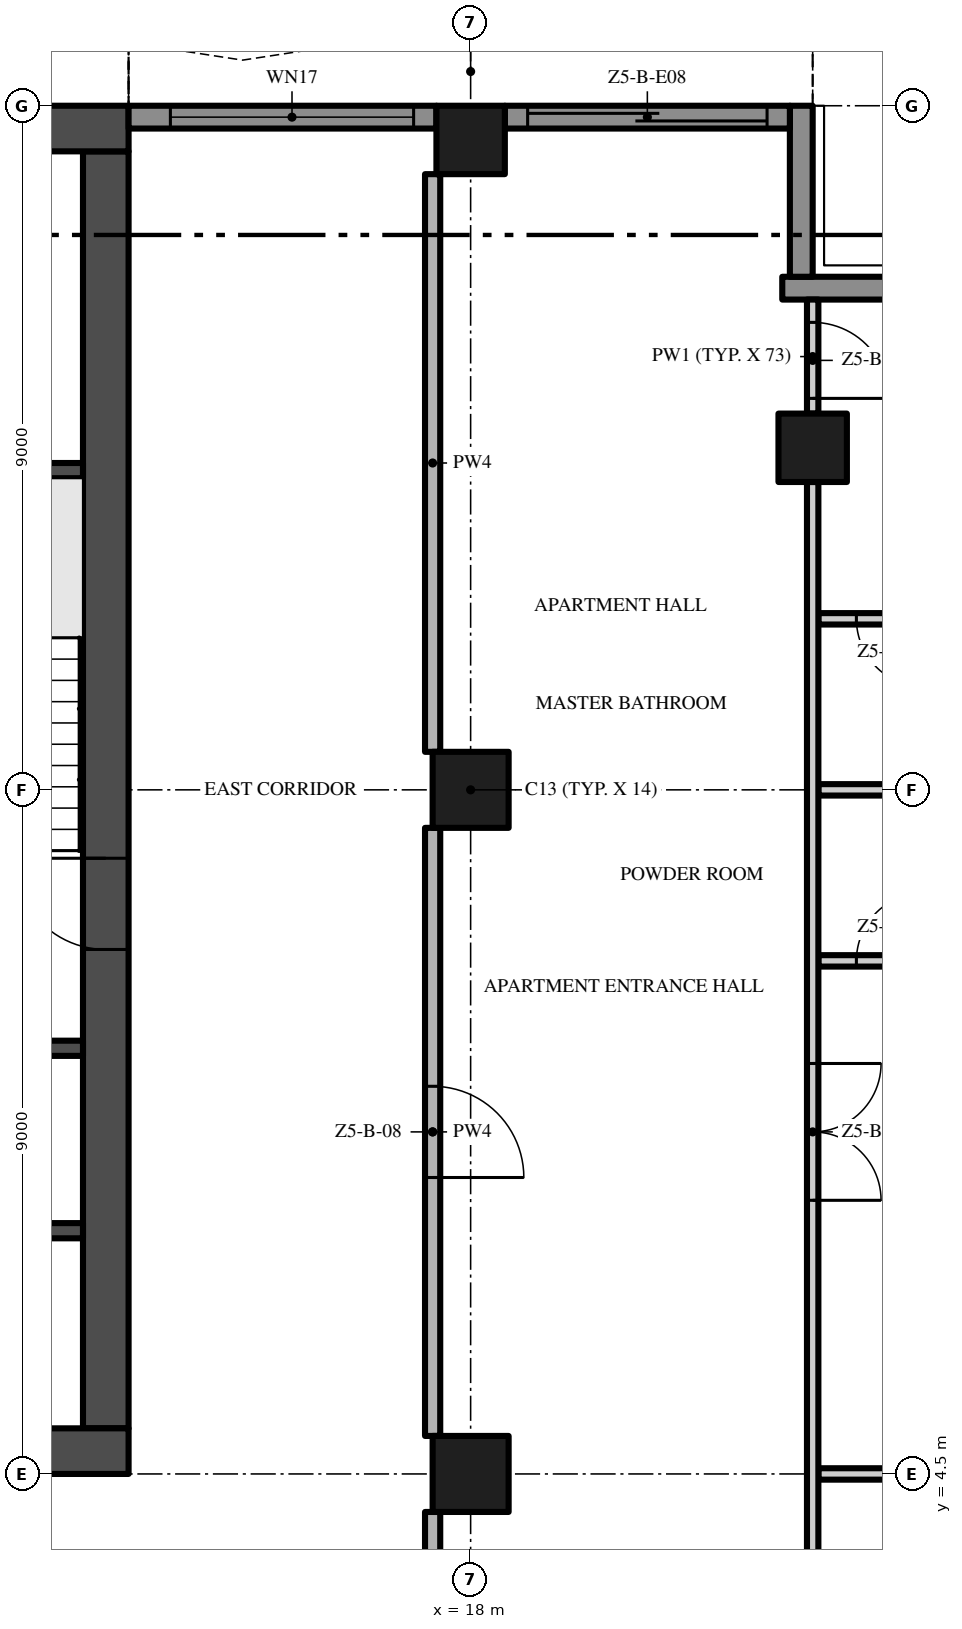
"""IFC4 building model, lengths in metres.
Left out: names, types, materials, properties, quantities, classifications, styles, units other than length and angle.
Written with IfcOpenShell. Run it as: python <this file> out.ifc"""

import sys

from ifc_helpers import new_model, si_unit, direction, frame, frame_2d, origin, origin_2d, place, context, subcontext, project, spatial, polyline, rectangle, outline, extrude, element, fill, save


model = new_model("IFC4")
c1 = context("Model", 3, precision=1e-05, world=origin(), true_north=direction((0.0, 1.0)))
c2 = subcontext(c1, "Body", "Model", "MODEL_VIEW")
j1 = project(units=[si_unit("LENGTHUNIT", "METRE"), si_unit("PLANEANGLEUNIT", "RADIAN")], contexts=[c1])
p1 = place(None, origin())
s1 = spatial("IfcSite", under=j1, at=p1, CompositionType="ELEMENT")
p2 = place(p1, origin())
s2 = spatial("IfcBuilding", under=s1, at=p2, CompositionType="ELEMENT")
p3 = place(p2, frame((0.0, 0.0, 250.2)))
s3 = spatial("IfcBuildingStorey", under=s2, at=p3, CompositionType="ELEMENT", Elevation=250.2)
p4 = place(p3, frame((-13.5, 4.8, -0.3), z_axis=(0.0, 0.0, 1.0), x_axis=(1.0, 0.0, 0.0)))
e1 = element("IfcWall", 1, at=p4, inside=s3, PredefinedType="SHEAR", context=c2, shape_type="SweptSolid", body=[
    extrude(rectangle(XDim=27.0, YDim=0.6, at=frame_2d((13.5, 0.0))), origin(), (0.0, 0.0, 1.0), 3.8),
])
p5 = place(p4, frame((12.0, 0.0, 0.3)))
e2 = element("IfcOpeningElement", 2, at=p5, cuts=e1, PredefinedType="OPENING", context=c2, shape_type="SweptSolid", body=[
    extrude(rectangle(XDim=3.0, YDim=2.4, at=frame_2d((1.5, 1.2))), frame((0.0, 0.31, 0.0), z_axis=(0.0, -1.0, 0.0), x_axis=(1.0, 0.0, 0.0)), (0.0, 0.0, 1.0), 0.62),
])
p6 = place(p4, frame((4.9, 0.0, 0.3)))
e3 = element("IfcOpeningElement", 3, at=p6, cuts=e1, PredefinedType="OPENING", context=c2, shape_type="SweptSolid", body=[
    extrude(rectangle(XDim=1.2, YDim=2.2, at=frame_2d((0.6, 1.1))), frame((0.0, 0.31, 0.0), z_axis=(0.0, -1.0, 0.0), x_axis=(1.0, 0.0, 0.0)), (0.0, 0.0, 1.0), 0.62),
])
p7 = place(p4, frame((20.75, 0.0, 0.3)))
e4 = element("IfcOpeningElement", 4, at=p7, cuts=e1, PredefinedType="OPENING", context=c2, shape_type="SweptSolid", body=[
    extrude(rectangle(XDim=1.5, YDim=2.2, at=frame_2d((0.75, 1.1))), frame((0.0, 0.31, 0.0), z_axis=(0.0, -1.0, 0.0), x_axis=(1.0, 0.0, 0.0)), (0.0, 0.0, 1.0), 0.62),
])
p8 = place(p4, frame((17.4, 0.0, 0.3)))
e5 = element("IfcOpeningElement", 5, at=p8, cuts=e1, PredefinedType="OPENING", context=c2, shape_type="SweptSolid", body=[
    extrude(rectangle(XDim=1.2, YDim=2.2, at=frame_2d((0.6, 1.1))), frame((0.0, 0.31, 0.0), z_axis=(0.0, -1.0, 0.0), x_axis=(1.0, 0.0, 0.0)), (0.0, 0.0, 1.0), 0.62),
])
p9 = place(p3, frame((13.2, 5.1, -0.3), z_axis=(0.0, 0.0, 1.0), x_axis=(0.0, 1.0, 0.0)))
e6 = element("IfcWall", 6, at=p9, inside=s3, PredefinedType="SHEAR", context=c2, shape_type="SweptSolid", body=[
    extrude(rectangle(XDim=16.8, YDim=0.6, at=frame_2d((8.4, 0.0))), origin(), (0.0, 0.0, 1.0), 3.8),
])
p10 = place(p9, frame((6.3, 0.0, 0.3)))
e7 = element("IfcOpeningElement", 7, at=p10, cuts=e6, PredefinedType="OPENING", context=c2, shape_type="SweptSolid", body=[
    extrude(rectangle(XDim=1.2, YDim=2.2, at=frame_2d((0.6, 1.1))), frame((0.0, 0.31, 0.0), z_axis=(0.0, -1.0, 0.0), x_axis=(1.0, 0.0, 0.0)), (0.0, 0.0, 1.0), 0.62),
])
p11 = place(p3, frame((13.5, 22.2, -0.3), z_axis=(0.0, 0.0, 1.0), x_axis=(-1.0, 0.0, 0.0)))
e8 = element("IfcWall", 8, at=p11, inside=s3, PredefinedType="SHEAR", context=c2, shape_type="SweptSolid", body=[
    extrude(rectangle(XDim=27.0, YDim=0.6, at=frame_2d((13.5, 0.0))), origin(), (0.0, 0.0, 1.0), 3.8),
])
p12 = place(p3, frame((18.0, 13.5, 0.0), z_axis=(0.0, 0.0, 1.0), x_axis=(1.0, 0.0, 0.0)))
e9 = element("IfcColumn", 9, at=p12, inside=s3, PredefinedType="COLUMN", context=c2, shape_type="SweptSolid", body=[
    extrude(rectangle(XDim=1.0, YDim=1.0, at=origin_2d()), origin(), (0.0, 0.0, 1.0), 3.5),
])
p13 = place(p3, frame((18.0, 22.05, 0.0), z_axis=(0.0, 0.0, 1.0), x_axis=(1.0, 0.0, 0.0)))
e10 = element("IfcColumn", 10, at=p13, inside=s3, PredefinedType="COLUMN", context=c2, shape_type="SweptSolid", body=[
    extrude(rectangle(XDim=0.9, YDim=0.9, at=origin_2d()), origin(), (0.0, 0.0, 1.0), 3.5),
])
p14 = place(p3, frame((18.0, 4.5, 0.0), z_axis=(0.0, 0.0, 1.0), x_axis=(1.0, 0.0, 0.0)))
e11 = element("IfcColumn", 11, at=p14, inside=s3, PredefinedType="COLUMN", context=c2, shape_type="SweptSolid", body=[
    extrude(rectangle(XDim=1.0, YDim=1.0, at=origin_2d()), origin(), (0.0, 0.0, 1.0), 3.5),
])
p15 = place(p3, frame((22.5, 18.0, 0.0), z_axis=(0.0, 0.0, 1.0), x_axis=(1.0, 0.0, 0.0)))
e12 = element("IfcColumn", 12, at=p15, inside=s3, PredefinedType="COLUMN", context=c2, shape_type="SweptSolid", body=[
    extrude(rectangle(XDim=0.9, YDim=0.9, at=origin_2d()), origin(), (0.0, 0.0, 1.0), 3.5),
])
p16 = place(p3, frame((22.1, 20.1, 0.0), z_axis=(0.0, 0.0, 1.0), x_axis=(1.0, 0.0, 0.0)))
e13 = element("IfcWall", 13, at=p16, inside=s3, PredefinedType="SOLIDWALL", context=c2, shape_type="SweptSolid", body=[
    extrude(rectangle(XDim=2.35, YDim=0.3, at=frame_2d((1.175, 0.0))), origin(), (0.0, 0.0, 1.0), 3.5),
])
p17 = place(p3, frame((22.35, 22.5, 0.0), z_axis=(0.0, 0.0, 1.0), x_axis=(0.0, -1.0, 0.0)))
e14 = element("IfcWall", 14, at=p17, inside=s3, PredefinedType="SOLIDWALL", context=c2, shape_type="SweptSolid", body=[
    extrude(rectangle(XDim=2.25, YDim=0.3, at=frame_2d((1.125, 0.0))), origin(), (0.0, 0.0, 1.0), 3.5),
])
p18 = place(p3, frame((18.45, 22.35, 0.0), z_axis=(0.0, 0.0, 1.0), x_axis=(1.0, 0.0, 0.0)))
e15 = element("IfcWall", 15, at=p18, inside=s3, PredefinedType="SOLIDWALL", context=c2, shape_type="SweptSolid", body=[
    extrude(rectangle(XDim=3.75, YDim=0.3, at=frame_2d((1.875, 0.0))), origin(), (0.0, 0.0, 1.0), 3.5),
])
p19 = place(p18, frame((0.3, 0.0, 0.0)))
e16 = element("IfcOpeningElement", 16, at=p19, cuts=e15, PredefinedType="OPENING", context=c2, shape_type="SweptSolid", body=[
    extrude(rectangle(XDim=3.15, YDim=2.4, at=frame_2d((1.575, 1.2))), frame((0.0, 0.16, 0.0), z_axis=(0.0, -1.0, 0.0), x_axis=(1.0, 0.0, 0.0)), (0.0, 0.0, 1.0), 0.32),
])
p20 = place(p3, frame((13.5, 22.35, 0.0), z_axis=(0.0, 0.0, 1.0), x_axis=(1.0, 0.0, 0.0)))
e17 = element("IfcWall", 17, at=p20, inside=s3, PredefinedType="SOLIDWALL", context=c2, shape_type="SweptSolid", body=[
    extrude(rectangle(XDim=4.05, YDim=0.3, at=frame_2d((2.025, 0.0))), origin(), (0.0, 0.0, 1.0), 3.5),
])
p21 = place(p20, frame((0.55, 0.0, 0.45)))
e18 = element("IfcOpeningElement", 18, at=p21, cuts=e17, PredefinedType="OPENING", context=c2, shape_type="SweptSolid", body=[
    extrude(rectangle(XDim=3.2, YDim=2.65, at=frame_2d((1.6, 1.325))), frame((0.0, 0.16, 0.0), z_axis=(0.0, -1.0, 0.0), x_axis=(1.0, 0.0, 0.0)), (0.0, 0.0, 1.0), 0.32),
])
p22 = place(p3, origin())
e19 = element("IfcWall", 19, at=p22, inside=s3, PredefinedType="USERDEFINED", context=c2, shape_type="SweptSolid", body=[
    extrude(outline(polyline([(22.5, 25.5), (21.0, 25.271), (19.5, 24.671), (18.0, 23.929), (16.5, 23.329), (15.0, 23.1), (13.5, 23.329), (13.462, 23.082), (15.0, 22.847), (16.566, 23.086), (18.102, 23.701), (19.602, 24.442), (21.066, 25.028), (22.538, 25.253), (22.5, 25.5)])), origin(), (0.0, 0.0, 1.0), 0.9),
])
for number, where, z_axis, x_axis in (
    (20, (9.65, 7.7, 0.0), (0.0, 0.0, 1.0), (1.0, 0.0, 0.0)),
    (21, (9.65, 10.1, 0.0), (0.0, 0.0, 1.0), (1.0, 0.0, 0.0)),
    (22, (9.65, 17.7, 0.0), (0.0, 0.0, 1.0), (1.0, 0.0, 0.0)),
):
    element("IfcWall", number, at=place(p3, frame(where, z_axis=z_axis, x_axis=x_axis)), inside=s3, PredefinedType="SHEAR", context=c2, shape_type="SweptSolid", body=[
        extrude(rectangle(XDim=3.25, YDim=0.2, at=frame_2d((1.625, 0.0))), origin(), (0.0, 0.0, 1.0), 3.5),
    ])
p23 = place(p3, frame((22.575, 4.5, 0.0), z_axis=(0.0, 0.0, 1.0), x_axis=(1.0, 0.0, 0.0)))
e23 = element("IfcWall", 23, at=p23, inside=s3, PredefinedType="PARTITIONING", context=c2, shape_type="SweptSolid", body=[
    extrude(rectangle(XDim=3.525, YDim=0.15, at=frame_2d((1.762, 0.0))), origin(), (0.0, 0.0, 1.0), 3.5),
])
p24 = place(p3, frame((22.575, 11.25, 0.0), z_axis=(0.0, 0.0, 1.0), x_axis=(1.0, 0.0, 0.0)))
e24 = element("IfcWall", 24, at=p24, inside=s3, PredefinedType="PARTITIONING", context=c2, shape_type="SweptSolid", body=[
    extrude(rectangle(XDim=1.875, YDim=0.15, at=frame_2d((0.938, 0.0))), origin(), (0.0, 0.0, 1.0), 3.5),
])
p25 = place(p24, frame((0.5, 0.0, 0.0)))
e25 = element("IfcOpeningElement", 25, at=p25, cuts=e24, PredefinedType="OPENING", context=c2, shape_type="SweptSolid", body=[
    extrude(rectangle(XDim=0.9, YDim=2.1, at=frame_2d((0.45, 1.05))), frame((0.0, 0.085, 0.0), z_axis=(0.0, -1.0, 0.0), x_axis=(1.0, 0.0, 0.0)), (0.0, 0.0, 1.0), 0.17),
])
p26 = place(p3, frame((22.575, 13.5, 0.0), z_axis=(0.0, 0.0, 1.0), x_axis=(1.0, 0.0, 0.0)))
e26 = element("IfcWall", 26, at=p26, inside=s3, PredefinedType="PARTITIONING", context=c2, shape_type="SweptSolid", body=[
    extrude(rectangle(XDim=1.875, YDim=0.15, at=frame_2d((0.938, 0.0))), origin(), (0.0, 0.0, 1.0), 3.5),
])
p27 = place(p3, frame((24.45, 15.75, 0.0), z_axis=(0.0, 0.0, 1.0), x_axis=(-1.0, 0.0, 0.0)))
e27 = element("IfcWall", 27, at=p27, inside=s3, PredefinedType="PARTITIONING", context=c2, shape_type="SweptSolid", body=[
    extrude(rectangle(XDim=1.875, YDim=0.15, at=frame_2d((0.938, 0.0))), origin(), (0.0, 0.0, 1.0), 3.5),
])
p28 = place(p27, frame((0.475, 0.0, 0.0)))
e28 = element("IfcOpeningElement", 28, at=p28, cuts=e27, PredefinedType="OPENING", context=c2, shape_type="SweptSolid", body=[
    extrude(rectangle(XDim=0.9, YDim=2.1, at=frame_2d((0.45, 1.05))), frame((0.0, 0.085, 0.0), z_axis=(0.0, -1.0, 0.0), x_axis=(1.0, 0.0, 0.0)), (0.0, 0.0, 1.0), 0.17),
])
p29 = place(p3, frame((17.5, -0.2, 0.0), z_axis=(0.0, 0.0, 1.0), x_axis=(0.0, 1.0, 0.0)))
e29 = element("IfcWall", 29, at=p29, inside=s3, PredefinedType="PARTITIONING", context=c2, shape_type="SweptSolid", body=[
    extrude(rectangle(XDim=4.2, YDim=0.2, at=frame_2d((2.1, 0.0))), origin(), (0.0, 0.0, 1.0), 3.5),
])
p30 = place(p3, frame((17.5, 13.0, 0.0), z_axis=(0.0, 0.0, 1.0), x_axis=(0.0, -1.0, 0.0)))
e30 = element("IfcWall", 30, at=p30, inside=s3, PredefinedType="PARTITIONING", context=c2, shape_type="SweptSolid", body=[
    extrude(rectangle(XDim=8.0, YDim=0.2, at=frame_2d((4.0, 0.0))), origin(), (0.0, 0.0, 1.0), 3.5),
])
p31 = place(p30, frame((3.4, 0.0, 0.0)))
e31 = element("IfcOpeningElement", 31, at=p31, cuts=e30, PredefinedType="OPENING", context=c2, shape_type="SweptSolid", body=[
    extrude(rectangle(XDim=1.2, YDim=2.4, at=frame_2d((0.6, 1.2))), frame((0.0, 0.11, 0.0), z_axis=(0.0, -1.0, 0.0), x_axis=(1.0, 0.0, 0.0)), (0.0, 0.0, 1.0), 0.22),
])
p32 = place(p3, frame((17.5, 14.0, 0.0), z_axis=(0.0, 0.0, 1.0), x_axis=(0.0, 1.0, 0.0)))
e32 = element("IfcWall", 32, at=p32, inside=s3, PredefinedType="PARTITIONING", context=c2, shape_type="SweptSolid", body=[
    extrude(rectangle(XDim=7.6, YDim=0.2, at=frame_2d((3.8, 0.0))), origin(), (0.0, 0.0, 1.0), 3.5),
])
p33 = place(p3, frame((22.5, 17.55, 0.0), z_axis=(0.0, 0.0, 1.0), x_axis=(0.0, -1.0, 0.0)))
e33 = element("IfcWall", 33, at=p33, inside=s3, PredefinedType="PARTITIONING", context=c2, shape_type="SweptSolid", body=[
    extrude(rectangle(XDim=17.45, YDim=0.15, at=frame_2d((8.725, 0.0))), origin(), (0.0, 0.0, 1.0), 3.5),
])
p34 = place(p33, frame((14.8, 0.0, 0.0)))
e34 = element("IfcOpeningElement", 34, at=p34, cuts=e33, PredefinedType="OPENING", context=c2, shape_type="SweptSolid", body=[
    extrude(rectangle(XDim=1.0, YDim=2.4, at=frame_2d((0.5, 1.2))), frame((0.0, 0.085, 0.0), z_axis=(0.0, -1.0, 0.0), x_axis=(1.0, 0.0, 0.0)), (0.0, 0.0, 1.0), 0.17),
])
p35 = place(p33, frame((7.65, 0.0, 0.0)))
e35 = element("IfcOpeningElement", 35, at=p35, cuts=e33, PredefinedType="OPENING", context=c2, shape_type="SweptSolid", body=[
    extrude(rectangle(XDim=1.8, YDim=2.4, at=frame_2d((0.9, 1.2))), frame((0.0, 0.085, 0.0), z_axis=(0.0, -1.0, 0.0), x_axis=(1.0, 0.0, 0.0)), (0.0, 0.0, 1.0), 0.17),
])
p36 = place(p3, frame((22.5, 19.95, 0.0), z_axis=(0.0, 0.0, 1.0), x_axis=(0.0, -1.0, 0.0)))
e36 = element("IfcWall", 36, at=p36, inside=s3, PredefinedType="PARTITIONING", context=c2, shape_type="SweptSolid", body=[
    extrude(rectangle(XDim=1.5, YDim=0.15, at=frame_2d((0.75, 0.0))), origin(), (0.0, 0.0, 1.0), 3.5),
])
p37 = place(p36, frame((0.3, 0.0, 0.0)))
e37 = element("IfcOpeningElement", 37, at=p37, cuts=e36, PredefinedType="OPENING", context=c2, shape_type="SweptSolid", body=[
    extrude(rectangle(XDim=1.0, YDim=2.4, at=frame_2d((0.5, 1.2))), frame((0.0, 0.085, 0.0), z_axis=(0.0, -1.0, 0.0), x_axis=(1.0, 0.0, 0.0)), (0.0, 0.0, 1.0), 0.17),
])
p38 = place(p19, origin())
e38 = element("IfcDoor", 38, at=p38, inside=s3, OperationType="SINGLE_SWING_LEFT", PredefinedType="DOOR", context=c2, shape_type="SweptSolid", body=[
    extrude(rectangle(XDim=3.15, YDim=2.4, at=frame_2d((1.575, 1.2))), frame((0.0, 0.025, 0.0), z_axis=(0.0, -1.0, 0.0), x_axis=(1.0, 0.0, 0.0)), (0.0, 0.0, 1.0), 0.05),
])
fill(e16, e38)
p39 = place(p21, origin())
e39 = element("IfcWindow", 39, at=p39, inside=s3, PartitioningType="SINGLE_PANEL", PredefinedType="WINDOW", context=c2, shape_type="SweptSolid", body=[
    extrude(rectangle(XDim=3.2, YDim=2.65, at=frame_2d((1.6, 1.325))), frame((0.0, 0.03, 0.0), z_axis=(0.0, -1.0, 0.0), x_axis=(1.0, 0.0, 0.0)), (0.0, 0.0, 1.0), 0.06),
])
fill(e18, e39)
p40 = place(p10, frame((1.2, 0.0, 0.0), z_axis=(0.0, 0.0, 1.0), x_axis=(-1.0, 0.0, 0.0)))
e40 = element("IfcDoor", 40, at=p40, inside=s3, OperationType="SINGLE_SWING_LEFT", PredefinedType="DOOR", context=c2, shape_type="SweptSolid", body=[
    extrude(rectangle(XDim=1.2, YDim=2.2, at=frame_2d((0.6, 1.1))), frame((0.0, 0.025, 0.0), z_axis=(0.0, -1.0, 0.0), x_axis=(1.0, 0.0, 0.0)), (0.0, 0.0, 1.0), 0.05),
])
fill(e7, e40)
p41 = place(p31, origin())
e41 = element("IfcDoor", 41, at=p41, inside=s3, OperationType="SINGLE_SWING_RIGHT", PredefinedType="DOOR", context=c2, shape_type="SweptSolid", body=[
    extrude(rectangle(XDim=1.2, YDim=2.4, at=frame_2d((0.6, 1.2))), frame((0.0, 0.025, 0.0), z_axis=(0.0, -1.0, 0.0), x_axis=(1.0, 0.0, 0.0)), (0.0, 0.0, 1.0), 0.05),
])
fill(e31, e41)
p42 = place(p35, origin())
e42 = element("IfcDoor", 42, at=p42, inside=s3, OperationType="DOUBLE_DOOR_SINGLE_SWING", PredefinedType="DOOR", context=c2, shape_type="SweptSolid", body=[
    extrude(rectangle(XDim=1.8, YDim=2.4, at=frame_2d((0.9, 1.2))), frame((0.0, 0.025, 0.0), z_axis=(0.0, -1.0, 0.0), x_axis=(1.0, 0.0, 0.0)), (0.0, 0.0, 1.0), 0.05),
])
fill(e35, e42)
p43 = place(p25, origin())
e43 = element("IfcDoor", 43, at=p43, inside=s3, OperationType="SINGLE_SWING_RIGHT", PredefinedType="DOOR", context=c2, shape_type="SweptSolid", body=[
    extrude(rectangle(XDim=0.9, YDim=2.1, at=frame_2d((0.45, 1.05))), frame((0.0, 0.025, 0.0), z_axis=(0.0, -1.0, 0.0), x_axis=(1.0, 0.0, 0.0)), (0.0, 0.0, 1.0), 0.05),
])
fill(e25, e43)
p44 = place(p37, origin())
e44 = element("IfcDoor", 44, at=p44, inside=s3, OperationType="SINGLE_SWING_RIGHT", PredefinedType="DOOR", context=c2, shape_type="SweptSolid", body=[
    extrude(rectangle(XDim=1.0, YDim=2.4, at=frame_2d((0.5, 1.2))), frame((0.0, 0.025, 0.0), z_axis=(0.0, -1.0, 0.0), x_axis=(1.0, 0.0, 0.0)), (0.0, 0.0, 1.0), 0.05),
])
fill(e37, e44)
p45 = place(p28, origin())
e45 = element("IfcDoor", 45, at=p45, inside=s3, OperationType="SINGLE_SWING_LEFT", PredefinedType="DOOR", context=c2, shape_type="SweptSolid", body=[
    extrude(rectangle(XDim=0.9, YDim=2.1, at=frame_2d((0.45, 1.05))), frame((0.0, 0.025, 0.0), z_axis=(0.0, -1.0, 0.0), x_axis=(1.0, 0.0, 0.0)), (0.0, 0.0, 1.0), 0.05),
])
fill(e28, e45)
save(model, sys.argv[1])
